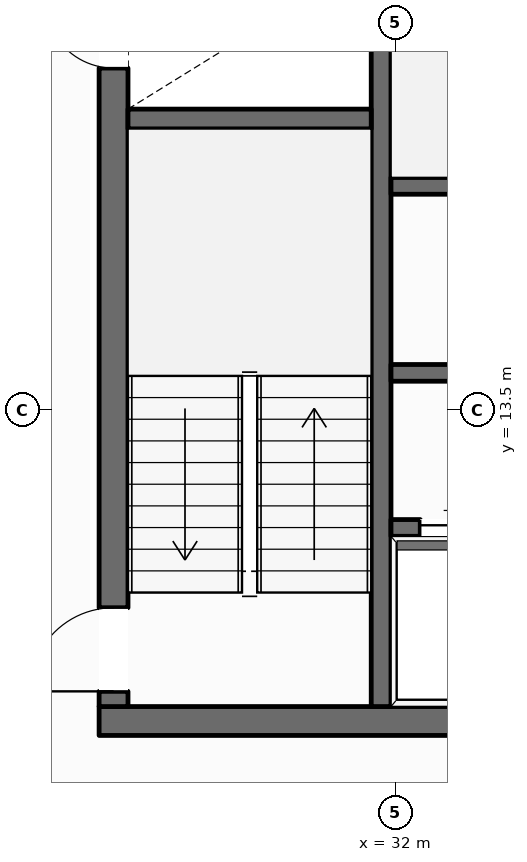
"""IFC4 building model, lengths in metres.
Left out: names, types, materials, properties, quantities, classifications, styles, units other than length and angle.
Written with IfcOpenShell. Run it as: python <this file> out.ifc"""

import sys

from ifc_helpers import new_model, si_unit, direction, frame, frame_2d, origin, place, context, subcontext, project, spatial, rectangle, extrude, element, fill, save


model = new_model("IFC4")
c1 = context("Model", 3, precision=1e-05, world=origin(), true_north=direction((0.0, 1.0)))
c2 = subcontext(c1, "Body", "Model", "MODEL_VIEW")
j1 = project(units=[si_unit("LENGTHUNIT", "METRE"), si_unit("PLANEANGLEUNIT", "RADIAN")], contexts=[c1])
p1 = place(None, origin())
s1 = spatial("IfcSite", under=j1, at=p1, CompositionType="ELEMENT")
p2 = place(p1, origin())
s2 = spatial("IfcBuilding", under=s1, at=p2, CompositionType="ELEMENT")
p3 = place(p2, frame((0.0, 0.0, 293.4)))
s3 = spatial("IfcBuildingStorey", under=s2, at=p3, CompositionType="ELEMENT", Elevation=293.4)
p4 = place(p3, frame((28.1, 9.41, 0.0), z_axis=(0.0, 0.0, 1.0), x_axis=(1.0, 0.0, 0.0)))
e1 = element("IfcWall", 1, at=p4, inside=s3, PredefinedType="SOLIDWALL", context=c2, shape_type="SweptSolid", body=[
    extrude(rectangle(XDim=19.8, YDim=0.38, at=frame_2d((9.9, 0.0))), origin(), (0.0, 0.0, 1.0), 3.61),
])
p5 = place(p4, frame((10.4, 0.0, 0.0)))
e2 = element("IfcOpeningElement", 2, at=p5, cuts=e1, PredefinedType="OPENING", context=c2, shape_type="SweptSolid", body=[
    extrude(rectangle(XDim=1.4, YDim=2.2, at=frame_2d((0.7, 1.1))), frame((0.0, 0.2, 0.0), z_axis=(0.0, -1.0, 0.0), x_axis=(1.0, 0.0, 0.0)), (0.0, 0.0, 1.0), 0.4),
])
p6 = place(p3, frame((28.29, 9.6, 0.0), z_axis=(0.0, 0.0, 1.0), x_axis=(0.0, 1.0, 0.0)))
e3 = element("IfcWall", 3, at=p6, inside=s3, PredefinedType="SOLIDWALL", context=c2, shape_type="SweptSolid", body=[
    extrude(rectangle(XDim=13.0, YDim=0.38, at=frame_2d((6.5, 0.0))), origin(), (0.0, 0.0, 1.0), 3.61),
])
p7 = place(p6, frame((0.2, 0.0, 0.0)))
e4 = element("IfcOpeningElement", 4, at=p7, cuts=e3, PredefinedType="OPENING", context=c2, shape_type="SweptSolid", body=[
    extrude(rectangle(XDim=1.1, YDim=2.15, at=frame_2d((0.55, 1.075))), frame((0.0, 0.2, 0.0), z_axis=(0.0, -1.0, 0.0), x_axis=(1.0, 0.0, 0.0)), (0.0, 0.0, 1.0), 0.4),
])
p8 = place(p6, frame((8.4, 0.0, 0.0)))
e5 = element("IfcOpeningElement", 5, at=p8, cuts=e3, PredefinedType="OPENING", context=c2, shape_type="SweptSolid", body=[
    extrude(rectangle(XDim=0.9, YDim=2.1, at=frame_2d((0.45, 1.05))), frame((0.0, 0.2, 0.0), z_axis=(0.0, -1.0, 0.0), x_axis=(1.0, 0.0, 0.0)), (0.0, 0.0, 1.0), 0.4),
])
p9 = place(p3, frame((31.81, 9.6, 0.0), z_axis=(0.0, 0.0, 1.0), x_axis=(0.0, 1.0, 0.0)))
e6 = element("IfcWall", 6, at=p9, inside=s3, PredefinedType="SHEAR", context=c2, shape_type="SweptSolid", body=[
    extrude(rectangle(XDim=13.0, YDim=0.26, at=frame_2d((6.5, 0.0))), origin(), (0.0, 0.0, 1.0), 3.61),
])
p10 = place(p9, frame((10.925, 0.0, 0.0)))
e7 = element("IfcOpeningElement", 7, at=p10, cuts=e6, PredefinedType="OPENING", context=c2, shape_type="SweptSolid", body=[
    extrude(rectangle(XDim=1.25, YDim=2.25, at=frame_2d((0.625, 1.125))), frame((0.0, 0.14, 0.0), z_axis=(0.0, -1.0, 0.0), x_axis=(1.0, 0.0, 0.0)), (0.0, 0.0, 1.0), 0.28),
])
p11 = place(p3, frame((28.48, 17.33, 0.0), z_axis=(0.0, 0.0, 1.0), x_axis=(1.0, 0.0, 0.0)))
e8 = element("IfcWall", 8, at=p11, inside=s3, PredefinedType="SHEAR", context=c2, shape_type="SweptSolid", body=[
    extrude(rectangle(XDim=3.2, YDim=0.26, at=frame_2d((1.6, 0.0))), origin(), (0.0, 0.0, 1.0), 3.61),
])
p12 = place(p3, frame((31.94, 16.45, 0.0), z_axis=(0.0, 0.0, 1.0), x_axis=(1.0, 0.0, 0.0)))
e9 = element("IfcWall", 9, at=p12, inside=s3, PredefinedType="SOLIDWALL", context=c2, shape_type="SweptSolid", body=[
    extrude(rectangle(XDim=12.12, YDim=0.22, at=frame_2d((6.06, 0.0))), origin(), (0.0, 0.0, 1.0), 3.61),
])
p13 = place(p3, frame((31.94, 13.99, 0.0), z_axis=(0.0, 0.0, 1.0), x_axis=(1.0, 0.0, 0.0)))
e10 = element("IfcWall", 10, at=p13, inside=s3, PredefinedType="SOLIDWALL", context=c2, shape_type="SweptSolid", body=[
    extrude(rectangle(XDim=12.12, YDim=0.22, at=frame_2d((6.06, 0.0))), origin(), (0.0, 0.0, 1.0), 3.61),
])
p14 = place(p13, frame((3.11, 0.0, 0.0)))
e11 = element("IfcOpeningElement", 11, at=p14, cuts=e10, PredefinedType="OPENING", context=c2, shape_type="SweptSolid", body=[
    extrude(rectangle(XDim=0.9, YDim=2.1, at=frame_2d((0.45, 1.05))), frame((0.0, 0.12, 0.0), z_axis=(0.0, -1.0, 0.0), x_axis=(1.0, 0.0, 0.0)), (0.0, 0.0, 1.0), 0.24),
])
p15 = place(p13, frame((9.21, 0.0, 0.0)))
e12 = element("IfcOpeningElement", 12, at=p15, cuts=e10, PredefinedType="OPENING", context=c2, shape_type="SweptSolid", body=[
    extrude(rectangle(XDim=0.9, YDim=2.1, at=frame_2d((0.45, 1.05))), frame((0.0, 0.12, 0.0), z_axis=(0.0, -1.0, 0.0), x_axis=(1.0, 0.0, 0.0)), (0.0, 0.0, 1.0), 0.24),
])
p16 = place(p3, frame((31.94, 11.95, 0.0), z_axis=(0.0, 0.0, 1.0), x_axis=(1.0, 0.0, 0.0)))
e13 = element("IfcWall", 13, at=p16, inside=s3, PredefinedType="SOLIDWALL", context=c2, shape_type="SweptSolid", body=[
    extrude(rectangle(XDim=6.19, YDim=0.22, at=frame_2d((3.095, 0.0))), origin(), (0.0, 0.0, 1.0), 3.61),
])
p17 = place(p16, frame((0.385, 0.0, 0.0)))
e14 = element("IfcOpeningElement", 14, at=p17, cuts=e13, PredefinedType="OPENING", context=c2, shape_type="SweptSolid", body=[
    extrude(rectangle(XDim=1.1, YDim=2.2, at=frame_2d((0.55, 1.1))), frame((0.0, 0.12, 0.0), z_axis=(0.0, -1.0, 0.0), x_axis=(1.0, 0.0, 0.0)), (0.0, 0.0, 1.0), 0.24),
])
p18 = place(p16, frame((2.435, 0.0, 0.0)))
e15 = element("IfcOpeningElement", 15, at=p18, cuts=e13, PredefinedType="OPENING", context=c2, shape_type="SweptSolid", body=[
    extrude(rectangle(XDim=1.1, YDim=2.2, at=frame_2d((0.55, 1.1))), frame((0.0, 0.12, 0.0), z_axis=(0.0, -1.0, 0.0), x_axis=(1.0, 0.0, 0.0)), (0.0, 0.0, 1.0), 0.24),
])
p19 = place(p16, frame((4.485, 0.0, 0.0)))
e16 = element("IfcOpeningElement", 16, at=p19, cuts=e13, PredefinedType="OPENING", context=c2, shape_type="SweptSolid", body=[
    extrude(rectangle(XDim=1.1, YDim=2.2, at=frame_2d((0.55, 1.1))), frame((0.0, 0.12, 0.0), z_axis=(0.0, -1.0, 0.0), x_axis=(1.0, 0.0, 0.0)), (0.0, 0.0, 1.0), 0.24),
])
p20 = place(p3, frame((15.381, 10.05, 0.0), z_axis=(0.0, 0.0, 1.0), x_axis=(0.501350047618, 0.865244549104, 0.0)))
e17 = element("IfcWall", 17, at=p20, inside=s3, PredefinedType="STANDARD", context=c2, shape_type="SweptSolid", body=[
    extrude(rectangle(XDim=39.715, YDim=0.35, at=frame_2d((19.857, 0.0))), origin(), (0.0, 0.0, 1.0), 3.196),
])
p21 = place(p20, frame((9.529, 0.0, 0.0)))
e18 = element("IfcOpeningElement", 18, at=p21, cuts=e17, PredefinedType="OPENING", context=c2, shape_type="SweptSolid", body=[
    extrude(rectangle(XDim=1.0, YDim=2.2, at=frame_2d((0.5, 1.1))), frame((0.0, 0.185, 0.0), z_axis=(0.0, -1.0, 0.0), x_axis=(1.0, 0.0, 0.0)), (0.0, 0.0, 1.0), 0.37),
])
p22 = place(p20, frame((35.336, 0.0, 0.65)))
e19 = element("IfcOpeningElement", 19, at=p22, cuts=e17, PredefinedType="OPENING", context=c2, shape_type="SweptSolid", body=[
    extrude(rectangle(XDim=1.35, YDim=1.75, at=frame_2d((0.675, 0.875))), frame((0.0, 0.185, 0.0), z_axis=(0.0, -1.0, 0.0), x_axis=(1.0, 0.0, 0.0)), (0.0, 0.0, 1.0), 0.37),
])
p23 = place(p20, frame((28.875, 0.0, 0.65)))
e20 = element("IfcOpeningElement", 20, at=p23, cuts=e17, PredefinedType="OPENING", context=c2, shape_type="SweptSolid", body=[
    extrude(rectangle(XDim=1.35, YDim=1.75, at=frame_2d((0.675, 0.875))), frame((0.0, 0.185, 0.0), z_axis=(0.0, -1.0, 0.0), x_axis=(1.0, 0.0, 0.0)), (0.0, 0.0, 1.0), 0.37),
])
p24 = place(p20, frame((22.414, 0.0, 0.65)))
e21 = element("IfcOpeningElement", 21, at=p24, cuts=e17, PredefinedType="OPENING", context=c2, shape_type="SweptSolid", body=[
    extrude(rectangle(XDim=1.35, YDim=1.75, at=frame_2d((0.675, 0.875))), frame((0.0, 0.185, 0.0), z_axis=(0.0, -1.0, 0.0), x_axis=(1.0, 0.0, 0.0)), (0.0, 0.0, 1.0), 0.37),
])
p25 = place(p20, frame((3.03, 0.0, 0.65)))
e22 = element("IfcOpeningElement", 22, at=p25, cuts=e17, PredefinedType="OPENING", context=c2, shape_type="SweptSolid", body=[
    extrude(rectangle(XDim=1.35, YDim=1.75, at=frame_2d((0.675, 0.875))), frame((0.0, 0.185, 0.0), z_axis=(0.0, -1.0, 0.0), x_axis=(1.0, 0.0, 0.0)), (0.0, 0.0, 1.0), 0.37),
])
p26 = place(p7, origin())
e23 = element("IfcDoor", 23, at=p26, inside=s3, OperationType="SINGLE_SWING_LEFT", PredefinedType="DOOR", context=c2, shape_type="SweptSolid", body=[
    extrude(rectangle(XDim=1.1, YDim=2.15, at=frame_2d((0.55, 1.075))), frame((0.0, 0.025, 0.0), z_axis=(0.0, -1.0, 0.0), x_axis=(1.0, 0.0, 0.0)), (0.0, 0.0, 1.0), 0.05),
])
fill(e4, e23)
p27 = place(p8, origin())
e24 = element("IfcDoor", 24, at=p27, inside=s3, OperationType="SINGLE_SWING_RIGHT", PredefinedType="DOOR", context=c2, shape_type="SweptSolid", body=[
    extrude(rectangle(XDim=0.9, YDim=2.1, at=frame_2d((0.45, 1.05))), frame((0.0, 0.025, 0.0), z_axis=(0.0, -1.0, 0.0), x_axis=(1.0, 0.0, 0.0)), (0.0, 0.0, 1.0), 0.05),
])
fill(e5, e24)
p28 = place(p17, origin())
e25 = element("IfcDoor", 25, at=p28, inside=s3, OperationType="DOUBLE_DOOR_SLIDING", PredefinedType="DOOR", context=c2, shape_type="SweptSolid", body=[
    extrude(rectangle(XDim=1.1, YDim=2.2, at=frame_2d((0.55, 1.1))), frame((0.0, 0.025, 0.0), z_axis=(0.0, -1.0, 0.0), x_axis=(1.0, 0.0, 0.0)), (0.0, 0.0, 1.0), 0.05),
])
fill(e14, e25)
save(model, sys.argv[1])
